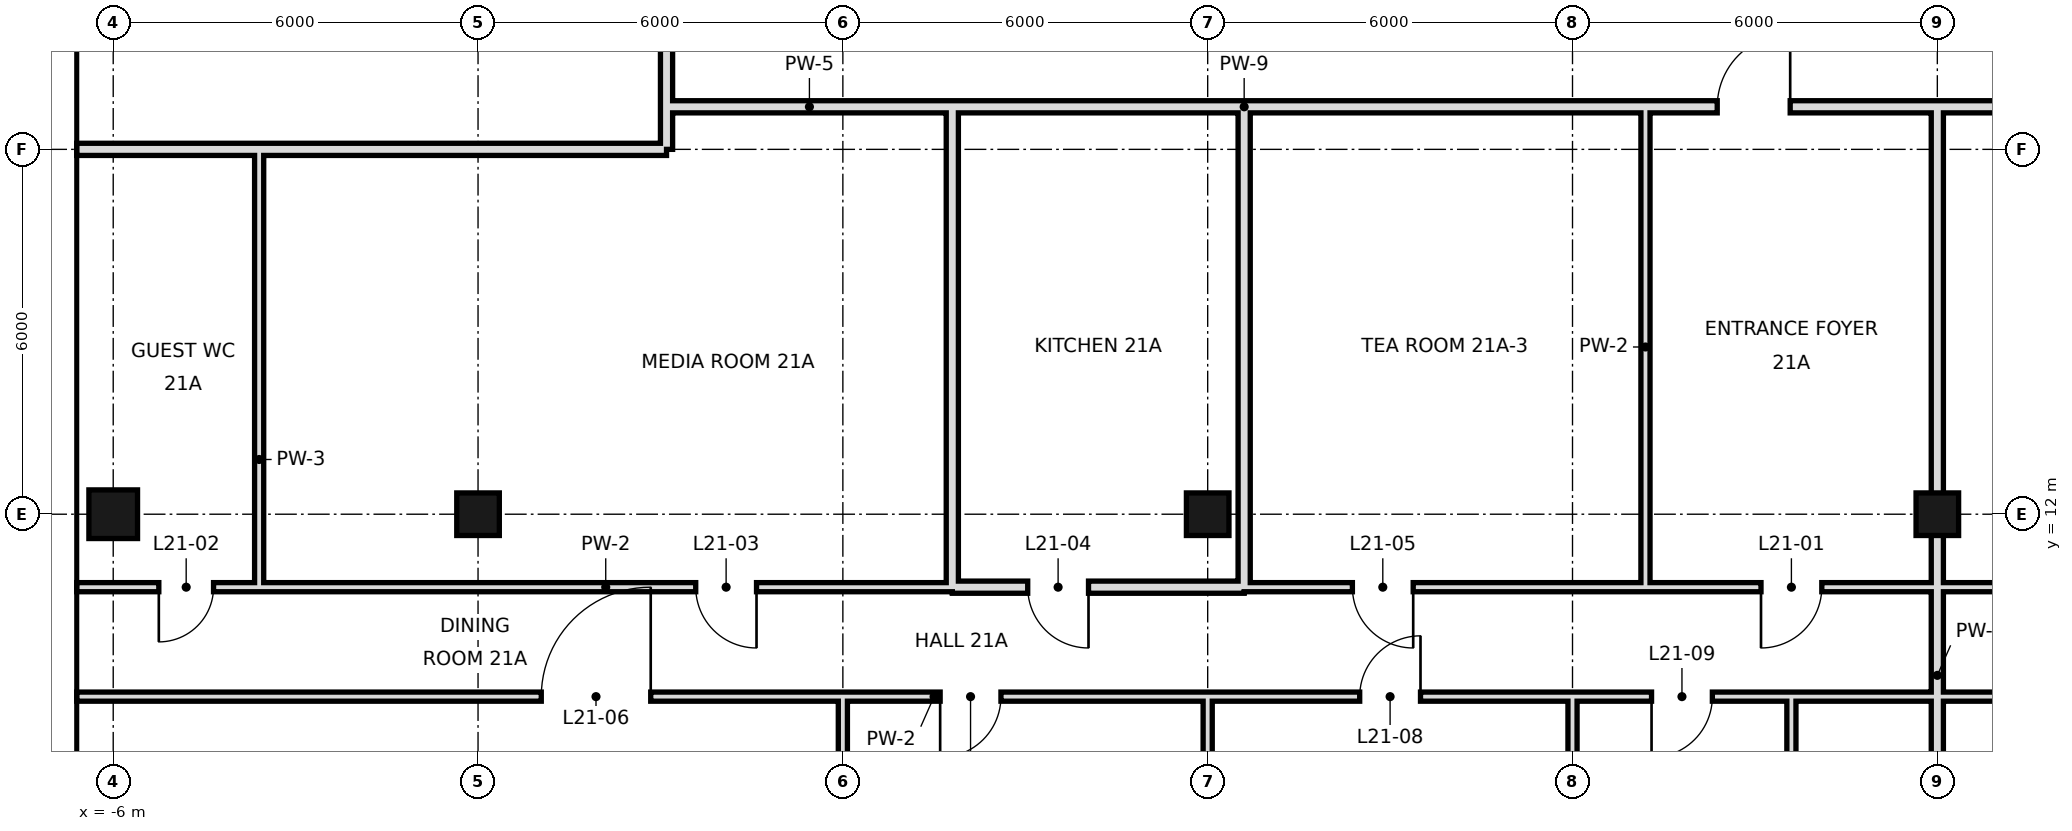
"""IFC4 building model, lengths in metres.
Left out: names, types, materials, properties, quantities, classifications, styles, units other than length and angle.
Written with IfcOpenShell. Run it as: python <this file> out.ifc"""

import sys

from ifc_helpers import new_model, si_unit, direction, frame, frame_2d, origin, origin_2d, place, context, subcontext, project, spatial, rectangle, hollow_rectangle, extrude, element, fill, save


model = new_model("IFC4")
c1 = context("Model", 3, precision=1e-05, world=origin(), true_north=direction((0.0, 1.0)))
c2 = subcontext(c1, "Body", "Model", "MODEL_VIEW")
j1 = project(units=[si_unit("LENGTHUNIT", "METRE"), si_unit("PLANEANGLEUNIT", "RADIAN")], contexts=[c1])
p1 = place(None, origin())
s1 = spatial("IfcSite", under=j1, at=p1, CompositionType="ELEMENT")
p2 = place(p1, origin())
s2 = spatial("IfcBuilding", under=s1, at=p2, CompositionType="ELEMENT")
p3 = place(p2, frame((0.0, 0.0, 99.8)))
s3 = spatial("IfcBuildingStorey", under=s2, at=p3, CompositionType="ELEMENT", Elevation=99.8)
p4 = place(p3, frame((-6.0, 12.0, 0.0), z_axis=(0.0, 0.0, 1.0), x_axis=(1.0, 0.0, 0.0)))
e1 = element("IfcColumn", 1, at=p4, inside=s3, PredefinedType="COLUMN", context=c2, shape_type="SweptSolid", body=[
    extrude(hollow_rectangle(XDim=0.8, YDim=0.8, WallThickness=0.04, at=origin_2d()), origin(), (0.0, 0.0, 1.0), 3.6),
])
for number, where, z_axis, x_axis in (
    (2, (0.0, 12.0, 0.0), (0.0, 0.0, 1.0), (1.0, 0.0, 0.0)),
    (3, (12.0, 12.0, 0.0), (0.0, 0.0, 1.0), (1.0, 0.0, 0.0)),
    (4, (24.0, 12.0, 0.0), (0.0, 0.0, 1.0), (1.0, 0.0, 0.0)),
):
    element("IfcColumn", number, at=place(p3, frame(where, z_axis=z_axis, x_axis=x_axis)), inside=s3, PredefinedType="COLUMN", context=c2, shape_type="SweptSolid", body=[
        extrude(hollow_rectangle(XDim=0.7, YDim=0.7, WallThickness=0.036, at=origin_2d()), origin(), (0.0, 0.0, 1.0), 3.6),
    ])
p5 = place(p3, frame((-3.6, 10.8, 0.0), z_axis=(0.0, 0.0, 1.0), x_axis=(0.0, 1.0, 0.0)))
e5 = element("IfcWall", 5, at=p5, inside=s3, PredefinedType="PARTITIONING", context=c2, shape_type="SweptSolid", body=[
    extrude(rectangle(XDim=7.2, YDim=0.15, at=frame_2d((3.6, 0.0))), origin(), (0.0, 0.0, 1.0), 3.42),
])
p6 = place(p3, frame((12.0, 0.0, 0.0), z_axis=(0.0, 0.0, 1.0), x_axis=(0.0, 1.0, 0.0)))
e6 = element("IfcWall", 6, at=p6, inside=s3, PredefinedType="PARTITIONING", context=c2, shape_type="SweptSolid", body=[
    extrude(rectangle(XDim=9.0, YDim=0.15, at=frame_2d((4.5, 0.0))), origin(), (0.0, 0.0, 1.0), 2.72),
])
p7 = place(p3, frame((12.6, 10.8, 0.0), z_axis=(0.0, 0.0, 1.0), x_axis=(0.0, 1.0, 0.0)))
e7 = element("IfcWall", 7, at=p7, inside=s3, PredefinedType="SOLIDWALL", context=c2, shape_type="SweptSolid", body=[
    extrude(rectangle(XDim=7.9, YDim=0.2, at=frame_2d((3.95, 0.0))), origin(), (0.0, 0.0, 1.0), 2.72),
])
p8 = place(p3, frame((18.0, -0.6, 0.0), z_axis=(0.0, 0.0, 1.0), x_axis=(0.0, 1.0, 0.0)))
e8 = element("IfcWall", 8, at=p8, inside=s3, PredefinedType="PARTITIONING", context=c2, shape_type="SweptSolid", body=[
    extrude(rectangle(XDim=9.6, YDim=0.15, at=frame_2d((4.8, 0.0))), origin(), (0.0, 0.0, 1.0), 2.72),
])
p9 = place(p3, frame((19.2, 10.8, 0.0), z_axis=(0.0, 0.0, 1.0), x_axis=(0.0, 1.0, 0.0)))
e9 = element("IfcWall", 9, at=p9, inside=s3, PredefinedType="PARTITIONING", context=c2, shape_type="SweptSolid", body=[
    extrude(rectangle(XDim=7.9, YDim=0.15, at=frame_2d((3.95, 0.0))), origin(), (0.0, 0.0, 1.0), 3.42),
])
p10 = place(p3, frame((21.6, 6.0, 0.0), z_axis=(0.0, 0.0, 1.0), x_axis=(0.0, 1.0, 0.0)))
e10 = element("IfcWall", 10, at=p10, inside=s3, PredefinedType="PARTITIONING", context=c2, shape_type="SweptSolid", body=[
    extrude(rectangle(XDim=3.0, YDim=0.15, at=frame_2d((1.5, 0.0))), origin(), (0.0, 0.0, 1.0), 3.42),
])
p11 = place(p3, frame((24.0, 0.0, 0.0), z_axis=(0.0, 0.0, 1.0), x_axis=(0.0, 1.0, 0.0)))
e11 = element("IfcWall", 11, at=p11, inside=s3, PredefinedType="SOLIDWALL", context=c2, shape_type="SweptSolid", body=[
    extrude(rectangle(XDim=18.7, YDim=0.2, at=frame_2d((9.35, 0.0))), origin(), (0.0, 0.0, 1.0), 2.72),
])
p12 = place(p3, frame((3.1, 18.0, 0.0), z_axis=(0.0, 0.0, 1.0), x_axis=(0.0, 1.0, 0.0)))
e12 = element("IfcWall", 12, at=p12, inside=s3, PredefinedType="SOLIDWALL", context=c2, shape_type="SweptSolid", body=[
    extrude(rectangle(XDim=30.6, YDim=0.2, at=frame_2d((15.3, 0.0))), origin(), (0.0, 0.0, 1.0), 2.72),
])
p13 = place(p12, frame((20.27, 0.0, 0.0)))
e13 = element("IfcOpeningElement", 13, at=p13, cuts=e12, PredefinedType="OPENING", context=c2, shape_type="SweptSolid", body=[
    extrude(rectangle(XDim=1.2, YDim=2.4, at=frame_2d((0.6, 1.2))), frame((0.0, 0.11, 0.0), z_axis=(0.0, -1.0, 0.0), x_axis=(1.0, 0.0, 0.0)), (0.0, 0.0, 1.0), 0.22),
])
p14 = place(p3, frame((6.0, -0.6, 0.0), z_axis=(0.0, 0.0, 1.0), x_axis=(0.0, 1.0, 0.0)))
e14 = element("IfcWall", 14, at=p14, inside=s3, PredefinedType="PARTITIONING", context=c2, shape_type="SweptSolid", body=[
    extrude(rectangle(XDim=9.6, YDim=0.15, at=frame_2d((4.8, 0.0))), origin(), (0.0, 0.0, 1.0), 2.72),
])
p15 = place(p3, frame((7.8, 10.8, 0.0), z_axis=(0.0, 0.0, 1.0), x_axis=(0.0, 1.0, 0.0)))
e15 = element("IfcWall", 15, at=p15, inside=s3, PredefinedType="SOLIDWALL", context=c2, shape_type="SweptSolid", body=[
    extrude(rectangle(XDim=7.9, YDim=0.2, at=frame_2d((3.95, 0.0))), origin(), (0.0, 0.0, 1.0), 2.72),
])
p16 = place(p3, frame((7.8, 10.8, 0.0), z_axis=(0.0, 0.0, 1.0), x_axis=(1.0, 0.0, 0.0)))
e16 = element("IfcWall", 16, at=p16, inside=s3, PredefinedType="SOLIDWALL", context=c2, shape_type="SweptSolid", body=[
    extrude(rectangle(XDim=4.8, YDim=0.2, at=frame_2d((2.4, 0.0))), origin(), (0.0, 0.0, 1.0), 2.72),
])
p17 = place(p16, frame((1.24, 0.0, 0.0)))
e17 = element("IfcOpeningElement", 17, at=p17, cuts=e16, PredefinedType="OPENING", context=c2, shape_type="SweptSolid", body=[
    extrude(rectangle(XDim=1.0, YDim=2.4, at=frame_2d((0.5, 1.2))), frame((0.0, 0.11, 0.0), z_axis=(0.0, -1.0, 0.0), x_axis=(1.0, 0.0, 0.0)), (0.0, 0.0, 1.0), 0.22),
])
p18 = place(p3, frame((-3.6, 10.8, 0.0), z_axis=(0.0, 0.0, 1.0), x_axis=(1.0, 0.0, 0.0)))
e18 = element("IfcWall", 18, at=p18, inside=s3, PredefinedType="PARTITIONING", context=c2, shape_type="SweptSolid", body=[
    extrude(rectangle(XDim=11.4, YDim=0.15, at=frame_2d((5.7, 0.0))), origin(), (0.0, 0.0, 1.0), 3.42),
])
p19 = place(p18, frame((7.18, 0.0, 0.0)))
e19 = element("IfcOpeningElement", 19, at=p19, cuts=e18, PredefinedType="OPENING", context=c2, shape_type="SweptSolid", body=[
    extrude(rectangle(XDim=1.0, YDim=2.4, at=frame_2d((0.5, 1.2))), frame((0.0, 0.085, 0.0), z_axis=(0.0, -1.0, 0.0), x_axis=(1.0, 0.0, 0.0)), (0.0, 0.0, 1.0), 0.17),
])
p20 = place(p3, frame((12.6, 10.8, 0.0), z_axis=(0.0, 0.0, 1.0), x_axis=(1.0, 0.0, 0.0)))
e20 = element("IfcWall", 20, at=p20, inside=s3, PredefinedType="PARTITIONING", context=c2, shape_type="SweptSolid", body=[
    extrude(rectangle(XDim=40.2, YDim=0.15, at=frame_2d((20.1, 0.0))), origin(), (0.0, 0.0, 1.0), 3.42),
])
p21 = place(p20, frame((8.5, 0.0, 0.0)))
e21 = element("IfcOpeningElement", 21, at=p21, cuts=e20, PredefinedType="OPENING", context=c2, shape_type="SweptSolid", body=[
    extrude(rectangle(XDim=1.0, YDim=2.4, at=frame_2d((0.5, 1.2))), frame((0.0, 0.085, 0.0), z_axis=(0.0, -1.0, 0.0), x_axis=(1.0, 0.0, 0.0)), (0.0, 0.0, 1.0), 0.17),
])
p22 = place(p20, frame((1.78, 0.0, 0.0)))
e22 = element("IfcOpeningElement", 22, at=p22, cuts=e20, PredefinedType="OPENING", context=c2, shape_type="SweptSolid", body=[
    extrude(rectangle(XDim=1.0, YDim=2.4, at=frame_2d((0.5, 1.2))), frame((0.0, 0.085, 0.0), z_axis=(0.0, -1.0, 0.0), x_axis=(1.0, 0.0, 0.0)), (0.0, 0.0, 1.0), 0.17),
])
p23 = place(p20, frame((23.8, 0.0, 0.0)))
e23 = element("IfcOpeningElement", 23, at=p23, cuts=e20, PredefinedType="OPENING", context=c2, shape_type="SweptSolid", body=[
    extrude(rectangle(XDim=1.0, YDim=2.4, at=frame_2d((0.5, 1.2))), frame((0.0, 0.085, 0.0), z_axis=(0.0, -1.0, 0.0), x_axis=(1.0, 0.0, 0.0)), (0.0, 0.0, 1.0), 0.17),
])
p24 = place(p20, frame((16.3, 0.0, 0.0)))
e24 = element("IfcOpeningElement", 24, at=p24, cuts=e20, PredefinedType="OPENING", context=c2, shape_type="SweptSolid", body=[
    extrude(rectangle(XDim=1.0, YDim=2.4, at=frame_2d((0.5, 1.2))), frame((0.0, 0.085, 0.0), z_axis=(0.0, -1.0, 0.0), x_axis=(1.0, 0.0, 0.0)), (0.0, 0.0, 1.0), 0.17),
])
p25 = place(p20, frame((33.7, 0.0, 0.0)))
e25 = element("IfcOpeningElement", 25, at=p25, cuts=e20, PredefinedType="OPENING", context=c2, shape_type="SweptSolid", body=[
    extrude(rectangle(XDim=1.0, YDim=2.4, at=frame_2d((0.5, 1.2))), frame((0.0, 0.085, 0.0), z_axis=(0.0, -1.0, 0.0), x_axis=(1.0, 0.0, 0.0)), (0.0, 0.0, 1.0), 0.17),
])
p26 = place(p3, frame((-6.6, 10.8, 0.0), z_axis=(0.0, 0.0, 1.0), x_axis=(1.0, 0.0, 0.0)))
e26 = element("IfcWall", 26, at=p26, inside=s3, PredefinedType="PARTITIONING", context=c2, shape_type="SweptSolid", body=[
    extrude(rectangle(XDim=3.0, YDim=0.15, at=frame_2d((1.5, 0.0))), origin(), (0.0, 0.0, 1.0), 3.42),
])
p27 = place(p26, frame((1.35, 0.0, 0.0)))
e27 = element("IfcOpeningElement", 27, at=p27, cuts=e26, PredefinedType="OPENING", context=c2, shape_type="SweptSolid", body=[
    extrude(rectangle(XDim=0.9, YDim=2.4, at=frame_2d((0.45, 1.2))), frame((0.0, 0.085, 0.0), z_axis=(0.0, -1.0, 0.0), x_axis=(1.0, 0.0, 0.0)), (0.0, 0.0, 1.0), 0.17),
])
p28 = place(p3, frame((-6.6, 18.0, 0.0), z_axis=(0.0, 0.0, 1.0), x_axis=(1.0, 0.0, 0.0)))
e28 = element("IfcWall", 28, at=p28, inside=s3, PredefinedType="SOLIDWALL", context=c2, shape_type="SweptSolid", body=[
    extrude(rectangle(XDim=9.7, YDim=0.2, at=frame_2d((4.85, 0.0))), origin(), (0.0, 0.0, 1.0), 2.72),
])
p29 = place(p3, frame((3.1, 18.7, 0.0), z_axis=(0.0, 0.0, 1.0), x_axis=(1.0, 0.0, 0.0)))
e29 = element("IfcWall", 29, at=p29, inside=s3, PredefinedType="SOLIDWALL", context=c2, shape_type="SweptSolid", body=[
    extrude(rectangle(XDim=4.7, YDim=0.2, at=frame_2d((2.35, 0.0))), origin(), (0.0, 0.0, 1.0), 2.72),
])
p30 = place(p3, frame((12.6, 18.7, 0.0), z_axis=(0.0, 0.0, 1.0), x_axis=(1.0, 0.0, 0.0)))
e30 = element("IfcWall", 30, at=p30, inside=s3, PredefinedType="SOLIDWALL", context=c2, shape_type="SweptSolid", body=[
    extrude(rectangle(XDim=32.3, YDim=0.2, at=frame_2d((16.15, 0.0))), origin(), (0.0, 0.0, 1.0), 2.72),
])
p31 = place(p30, frame((7.78, 0.0, 0.0)))
e31 = element("IfcOpeningElement", 31, at=p31, cuts=e30, PredefinedType="OPENING", context=c2, shape_type="SweptSolid", body=[
    extrude(rectangle(XDim=1.2, YDim=2.4, at=frame_2d((0.6, 1.2))), frame((0.0, 0.11, 0.0), z_axis=(0.0, -1.0, 0.0), x_axis=(1.0, 0.0, 0.0)), (0.0, 0.0, 1.0), 0.22),
])
p32 = place(p30, frame((24.6, 0.0, 0.0)))
e32 = element("IfcOpeningElement", 32, at=p32, cuts=e30, PredefinedType="OPENING", context=c2, shape_type="SweptSolid", body=[
    extrude(rectangle(XDim=1.2, YDim=2.4, at=frame_2d((0.6, 1.2))), frame((0.0, 0.11, 0.0), z_axis=(0.0, -1.0, 0.0), x_axis=(1.0, 0.0, 0.0)), (0.0, 0.0, 1.0), 0.22),
])
p33 = place(p3, frame((7.8, 18.7, 0.0), z_axis=(0.0, 0.0, 1.0), x_axis=(1.0, 0.0, 0.0)))
e33 = element("IfcWall", 33, at=p33, inside=s3, PredefinedType="SOLIDWALL", context=c2, shape_type="SweptSolid", body=[
    extrude(rectangle(XDim=4.8, YDim=0.2, at=frame_2d((2.4, 0.0))), origin(), (0.0, 0.0, 1.0), 3.42),
])
p34 = place(p3, frame((-6.6, 9.0, 0.0), z_axis=(0.0, 0.0, 1.0), x_axis=(1.0, 0.0, 0.0)))
e34 = element("IfcWall", 34, at=p34, inside=s3, PredefinedType="PARTITIONING", context=c2, shape_type="SweptSolid", body=[
    extrude(rectangle(XDim=28.2, YDim=0.15, at=frame_2d((14.1, 0.0))), origin(), (0.0, 0.0, 1.0), 3.42),
])
p35 = place(p34, frame((7.64, 0.0, 0.0)))
e35 = element("IfcOpeningElement", 35, at=p35, cuts=e34, PredefinedType="OPENING", context=c2, shape_type="SweptSolid", body=[
    extrude(rectangle(XDim=1.8, YDim=2.4, at=frame_2d((0.9, 1.2))), frame((0.0, 0.085, 0.0), z_axis=(0.0, -1.0, 0.0), x_axis=(1.0, 0.0, 0.0)), (0.0, 0.0, 1.0), 0.17),
])
p36 = place(p34, frame((14.2, 0.0, 0.0)))
e36 = element("IfcOpeningElement", 36, at=p36, cuts=e34, PredefinedType="OPENING", context=c2, shape_type="SweptSolid", body=[
    extrude(rectangle(XDim=1.0, YDim=2.4, at=frame_2d((0.5, 1.2))), frame((0.0, 0.085, 0.0), z_axis=(0.0, -1.0, 0.0), x_axis=(1.0, 0.0, 0.0)), (0.0, 0.0, 1.0), 0.17),
])
p37 = place(p34, frame((21.1, 0.0, 0.0)))
e37 = element("IfcOpeningElement", 37, at=p37, cuts=e34, PredefinedType="OPENING", context=c2, shape_type="SweptSolid", body=[
    extrude(rectangle(XDim=1.0, YDim=2.4, at=frame_2d((0.5, 1.2))), frame((0.0, 0.085, 0.0), z_axis=(0.0, -1.0, 0.0), x_axis=(1.0, 0.0, 0.0)), (0.0, 0.0, 1.0), 0.17),
])
p38 = place(p34, frame((25.9, 0.0, 0.0)))
e38 = element("IfcOpeningElement", 38, at=p38, cuts=e34, PredefinedType="OPENING", context=c2, shape_type="SweptSolid", body=[
    extrude(rectangle(XDim=1.0, YDim=2.4, at=frame_2d((0.5, 1.2))), frame((0.0, 0.085, 0.0), z_axis=(0.0, -1.0, 0.0), x_axis=(1.0, 0.0, 0.0)), (0.0, 0.0, 1.0), 0.17),
])
p39 = place(p3, frame((24.0, 9.0, 0.0), z_axis=(0.0, 0.0, 1.0), x_axis=(1.0, 0.0, 0.0)))
e39 = element("IfcWall", 39, at=p39, inside=s3, PredefinedType="PARTITIONING", context=c2, shape_type="SweptSolid", body=[
    extrude(rectangle(XDim=18.0, YDim=0.15, at=frame_2d((9.0, 0.0))), origin(), (0.0, 0.0, 1.0), 3.42),
])
p40 = place(p39, frame((2.1, 0.0, 0.0)))
e40 = element("IfcOpeningElement", 40, at=p40, cuts=e39, PredefinedType="OPENING", context=c2, shape_type="SweptSolid", body=[
    extrude(rectangle(XDim=1.8, YDim=2.4, at=frame_2d((0.9, 1.2))), frame((0.0, 0.085, 0.0), z_axis=(0.0, -1.0, 0.0), x_axis=(1.0, 0.0, 0.0)), (0.0, 0.0, 1.0), 0.17),
])
p41 = place(p39, frame((9.16, 0.0, 0.0)))
e41 = element("IfcOpeningElement", 41, at=p41, cuts=e39, PredefinedType="OPENING", context=c2, shape_type="SweptSolid", body=[
    extrude(rectangle(XDim=1.8, YDim=2.4, at=frame_2d((0.9, 1.2))), frame((0.0, 0.085, 0.0), z_axis=(0.0, -1.0, 0.0), x_axis=(1.0, 0.0, 0.0)), (0.0, 0.0, 1.0), 0.17),
])
p42 = place(p3, frame((21.6, 9.0, 0.0), z_axis=(0.0, 0.0, 1.0), x_axis=(1.0, 0.0, 0.0)))
e42 = element("IfcWall", 42, at=p42, inside=s3, PredefinedType="PARTITIONING", context=c2, shape_type="SweptSolid", body=[
    extrude(rectangle(XDim=2.4, YDim=0.15, at=frame_2d((1.2, 0.0))), origin(), (0.0, 0.0, 1.0), 3.42),
])
p43 = place(p21, frame((1.0, 0.0, 0.0), z_axis=(0.0, 0.0, 1.0), x_axis=(-1.0, 0.0, 0.0)))
e43 = element("IfcDoor", 43, at=p43, inside=s3, OperationType="SINGLE_SWING_RIGHT", PredefinedType="DOOR", context=c2, shape_type="SweptSolid", body=[
    extrude(rectangle(XDim=1.0, YDim=2.4, at=frame_2d((0.5, 1.2))), frame((0.0, 0.025, 0.0), z_axis=(0.0, -1.0, 0.0), x_axis=(1.0, 0.0, 0.0)), (0.0, 0.0, 1.0), 0.05),
])
fill(e21, e43)
p44 = place(p27, frame((0.9, 0.0, 0.0), z_axis=(0.0, 0.0, 1.0), x_axis=(-1.0, 0.0, 0.0)))
e44 = element("IfcDoor", 44, at=p44, inside=s3, OperationType="SINGLE_SWING_RIGHT", PredefinedType="DOOR", context=c2, shape_type="SweptSolid", body=[
    extrude(rectangle(XDim=0.9, YDim=2.4, at=frame_2d((0.45, 1.2))), frame((0.0, 0.025, 0.0), z_axis=(0.0, -1.0, 0.0), x_axis=(1.0, 0.0, 0.0)), (0.0, 0.0, 1.0), 0.05),
])
fill(e27, e44)
p45 = place(p19, origin())
e45 = element("IfcDoor", 45, at=p45, inside=s3, OperationType="SINGLE_SWING_RIGHT", PredefinedType="DOOR", context=c2, shape_type="SweptSolid", body=[
    extrude(rectangle(XDim=1.0, YDim=2.4, at=frame_2d((0.5, 1.2))), frame((0.0, 0.025, 0.0), z_axis=(0.0, -1.0, 0.0), x_axis=(1.0, 0.0, 0.0)), (0.0, 0.0, 1.0), 0.05),
])
fill(e19, e45)
p46 = place(p17, origin())
e46 = element("IfcDoor", 46, at=p46, inside=s3, OperationType="SINGLE_SWING_RIGHT", PredefinedType="DOOR", context=c2, shape_type="SweptSolid", body=[
    extrude(rectangle(XDim=1.0, YDim=2.4, at=frame_2d((0.5, 1.2))), frame((0.0, 0.025, 0.0), z_axis=(0.0, -1.0, 0.0), x_axis=(1.0, 0.0, 0.0)), (0.0, 0.0, 1.0), 0.05),
])
fill(e17, e46)
p47 = place(p22, origin())
e47 = element("IfcDoor", 47, at=p47, inside=s3, OperationType="SINGLE_SWING_RIGHT", PredefinedType="DOOR", context=c2, shape_type="SweptSolid", body=[
    extrude(rectangle(XDim=1.0, YDim=2.4, at=frame_2d((0.5, 1.2))), frame((0.0, 0.025, 0.0), z_axis=(0.0, -1.0, 0.0), x_axis=(1.0, 0.0, 0.0)), (0.0, 0.0, 1.0), 0.05),
])
fill(e22, e47)
p48 = place(p35, frame((1.8, 0.0, 0.0), z_axis=(0.0, 0.0, 1.0), x_axis=(-1.0, 0.0, 0.0)))
e48 = element("IfcDoor", 48, at=p48, inside=s3, OperationType="SINGLE_SWING_LEFT", PredefinedType="DOOR", context=c2, shape_type="SweptSolid", body=[
    extrude(rectangle(XDim=1.8, YDim=2.4, at=frame_2d((0.9, 1.2))), frame((0.0, 0.025, 0.0), z_axis=(0.0, -1.0, 0.0), x_axis=(1.0, 0.0, 0.0)), (0.0, 0.0, 1.0), 0.05),
])
fill(e35, e48)
p49 = place(p36, frame((1.0, 0.0, 0.0), z_axis=(0.0, 0.0, 1.0), x_axis=(-1.0, 0.0, 0.0)))
e49 = element("IfcDoor", 49, at=p49, inside=s3, OperationType="SINGLE_SWING_RIGHT", PredefinedType="DOOR", context=c2, shape_type="SweptSolid", body=[
    extrude(rectangle(XDim=1.0, YDim=2.4, at=frame_2d((0.5, 1.2))), frame((0.0, 0.025, 0.0), z_axis=(0.0, -1.0, 0.0), x_axis=(1.0, 0.0, 0.0)), (0.0, 0.0, 1.0), 0.05),
])
fill(e36, e49)
p50 = place(p37, frame((1.0, 0.0, 0.0), z_axis=(0.0, 0.0, 1.0), x_axis=(-1.0, 0.0, 0.0)))
e50 = element("IfcDoor", 50, at=p50, inside=s3, OperationType="SINGLE_SWING_LEFT", PredefinedType="DOOR", context=c2, shape_type="SweptSolid", body=[
    extrude(rectangle(XDim=1.0, YDim=2.4, at=frame_2d((0.5, 1.2))), frame((0.0, 0.025, 0.0), z_axis=(0.0, -1.0, 0.0), x_axis=(1.0, 0.0, 0.0)), (0.0, 0.0, 1.0), 0.05),
])
fill(e37, e50)
p51 = place(p38, frame((1.0, 0.0, 0.0), z_axis=(0.0, 0.0, 1.0), x_axis=(-1.0, 0.0, 0.0)))
e51 = element("IfcDoor", 51, at=p51, inside=s3, OperationType="SINGLE_SWING_RIGHT", PredefinedType="DOOR", context=c2, shape_type="SweptSolid", body=[
    extrude(rectangle(XDim=1.0, YDim=2.4, at=frame_2d((0.5, 1.2))), frame((0.0, 0.025, 0.0), z_axis=(0.0, -1.0, 0.0), x_axis=(1.0, 0.0, 0.0)), (0.0, 0.0, 1.0), 0.05),
])
fill(e38, e51)
p52 = place(p31, frame((1.2, 0.0, 0.0), z_axis=(0.0, 0.0, 1.0), x_axis=(-1.0, 0.0, 0.0)))
e52 = element("IfcDoor", 52, at=p52, inside=s3, OperationType="SINGLE_SWING_LEFT", PredefinedType="DOOR", context=c2, shape_type="SweptSolid", body=[
    extrude(rectangle(XDim=1.2, YDim=2.4, at=frame_2d((0.6, 1.2))), frame((0.0, 0.025, 0.0), z_axis=(0.0, -1.0, 0.0), x_axis=(1.0, 0.0, 0.0)), (0.0, 0.0, 1.0), 0.05),
])
fill(e31, e52)
save(model, sys.argv[1])
